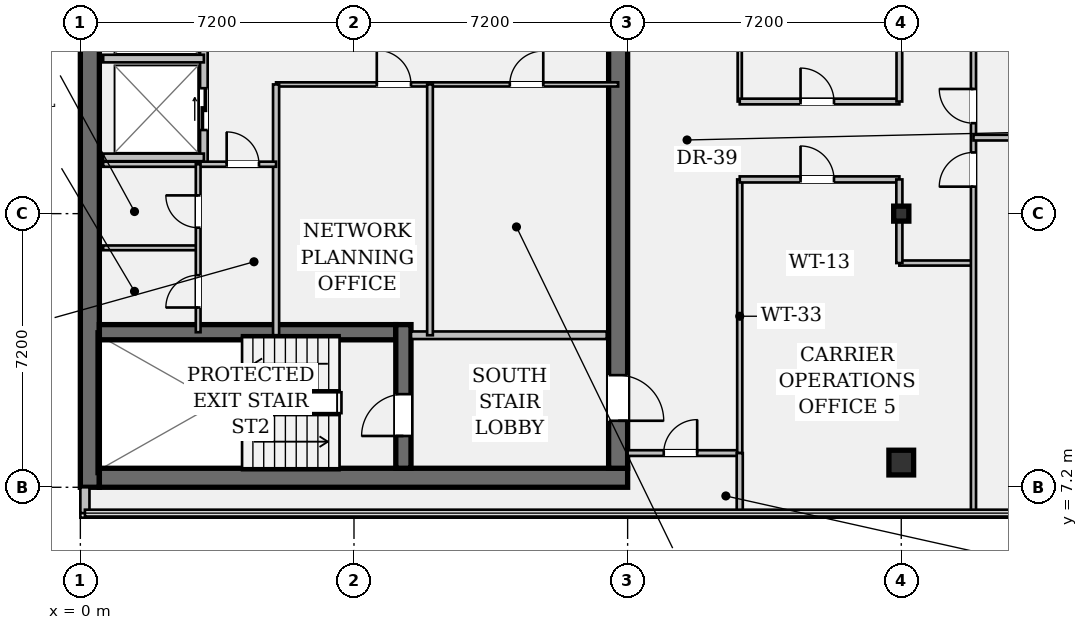
"""IFC4 building model, lengths in metres.
Left out: names, types, materials, properties, quantities, classifications, styles, units other than length and angle.
Written with IfcOpenShell. Run it as: python <this file> out.ifc"""

import sys

from ifc_helpers import new_model, si_unit, direction, frame, frame_2d, origin, origin_2d, place, context, subcontext, project, spatial, rectangle, hollow_rectangle, i_section, extrude, element, fill, save


model = new_model("IFC4")
c1 = context("Model", 3, precision=1e-05, world=origin(), true_north=direction((0.0, 1.0)))
c2 = subcontext(c1, "Body", "Model", "MODEL_VIEW")
j1 = project(units=[si_unit("LENGTHUNIT", "METRE"), si_unit("PLANEANGLEUNIT", "RADIAN")], contexts=[c1])
p1 = place(None, origin())
s1 = spatial("IfcSite", under=j1, at=p1, CompositionType="ELEMENT")
p2 = place(p1, origin())
s2 = spatial("IfcBuilding", under=s1, at=p2, CompositionType="ELEMENT")
p3 = place(p2, frame((0.0, 0.0, 255.15)))
s3 = spatial("IfcBuildingStorey", under=s2, at=p3, CompositionType="ELEMENT", Elevation=255.15)
p4 = place(p3, frame((0.25, 7.2, 0.0), z_axis=(0.0, 0.0, 1.0), x_axis=(0.0, 1.0, 0.0)))
e1 = element("IfcWall", 1, at=p4, inside=s3, PredefinedType="SHEAR", context=c2, shape_type="SweptSolid", body=[
    extrude(rectangle(XDim=28.8, YDim=0.5, at=frame_2d((14.4, 0.0))), origin(), (0.0, 0.0, 1.0), 3.24),
])
p5 = place(p3, frame((0.5, 7.45, 0.0), z_axis=(0.0, 0.0, 1.0), x_axis=(1.0, 0.0, 0.0)))
e2 = element("IfcWall", 2, at=p5, inside=s3, PredefinedType="SHEAR", context=c2, shape_type="SweptSolid", body=[
    extrude(rectangle(XDim=13.9, YDim=0.5, at=frame_2d((6.95, 0.0))), origin(), (0.0, 0.0, 1.0), 3.24),
])
p6 = place(p3, frame((14.15, 35.5, 0.0), z_axis=(0.0, 0.0, 1.0), x_axis=(0.0, -1.0, 0.0)))
e3 = element("IfcWall", 3, at=p6, inside=s3, PredefinedType="SHEAR", context=c2, shape_type="SweptSolid", body=[
    extrude(rectangle(XDim=27.8, YDim=0.5, at=frame_2d((13.9, 0.0))), origin(), (0.0, 0.0, 1.0), 3.24),
])
p7 = place(p6, frame((1.4, 0.0, 0.0)))
e4 = element("IfcOpeningElement", 4, at=p7, cuts=e3, PredefinedType="OPENING", context=c2, shape_type="SweptSolid", body=[
    extrude(rectangle(XDim=1.2, YDim=2.15, at=frame_2d((0.6, 1.075))), frame((0.0, 0.262, 0.0), z_axis=(0.0, -1.0, 0.0), x_axis=(1.0, 0.0, 0.0)), (0.0, 0.0, 1.0), 0.524),
])
p8 = place(p6, frame((25.35, 0.0, 0.0)))
e5 = element("IfcOpeningElement", 5, at=p8, cuts=e3, PredefinedType="OPENING", context=c2, shape_type="SweptSolid", body=[
    extrude(rectangle(XDim=1.2, YDim=2.15, at=frame_2d((0.6, 1.075))), frame((0.0, 0.262, 0.0), z_axis=(0.0, -1.0, 0.0), x_axis=(1.0, 0.0, 0.0)), (0.0, 0.0, 1.0), 0.524),
])
p9 = place(p6, frame((14.7, 0.0, 0.0)))
e6 = element("IfcOpeningElement", 6, at=p9, cuts=e3, PredefinedType="OPENING", context=c2, shape_type="SweptSolid", body=[
    extrude(rectangle(XDim=1.6, YDim=2.2, at=frame_2d((0.8, 1.1))), frame((0.0, 0.262, 0.0), z_axis=(0.0, -1.0, 0.0), x_axis=(1.0, 0.0, 0.0)), (0.0, 0.0, 1.0), 0.524),
])
p10 = place(p3, frame((0.5, 11.28, 0.0), z_axis=(0.0, 0.0, 1.0), x_axis=(1.0, 0.0, 0.0)))
e7 = element("IfcWall", 7, at=p10, inside=s3, PredefinedType="SHEAR", context=c2, shape_type="SweptSolid", body=[
    extrude(rectangle(XDim=7.8, YDim=0.4, at=frame_2d((3.9, 0.0))), origin(), (0.0, 0.0, 1.0), 3.24),
])
p11 = place(p3, frame((8.5, 7.7, 0.0), z_axis=(0.0, 0.0, 1.0), x_axis=(0.0, 1.0, 0.0)))
e8 = element("IfcWall", 8, at=p11, inside=s3, PredefinedType="SHEAR", context=c2, shape_type="SweptSolid", body=[
    extrude(rectangle(XDim=3.78, YDim=0.4, at=frame_2d((1.89, 0.0))), origin(), (0.0, 0.0, 1.0), 3.24),
])
p12 = place(p11, frame((0.85, 0.0, 0.0)))
e9 = element("IfcOpeningElement", 9, at=p12, cuts=e8, PredefinedType="OPENING", context=c2, shape_type="SweptSolid", body=[
    extrude(rectangle(XDim=1.1, YDim=2.15, at=frame_2d((0.55, 1.075))), frame((0.0, 0.212, 0.0), z_axis=(0.0, -1.0, 0.0), x_axis=(1.0, 0.0, 0.0)), (0.0, 0.0, 1.0), 0.424),
])
p13 = place(p3, frame((21.6, 7.85, 0.0), z_axis=(0.0, 0.0, 1.0), x_axis=(1.0, 0.0, 0.0)))
e10 = element("IfcColumn", 10, at=p13, inside=s3, PredefinedType="COLUMN", context=c2, shape_type="SweptSolid", body=[
    extrude(hollow_rectangle(XDim=0.65, YDim=0.65, WallThickness=0.04, at=origin_2d()), origin(), (0.0, 0.0, 1.0), 3.24),
])
p14 = place(p3, frame((21.6, 14.4, 0.0), z_axis=(0.0, 0.0, 1.0), x_axis=(1.0, 0.0, 0.0)))
e11 = element("IfcColumn", 11, at=p14, inside=s3, PredefinedType="COLUMN", context=c2, shape_type="SweptSolid", body=[
    extrude(i_section(OverallWidth=0.399, OverallDepth=0.394, WebThickness=0.023, FlangeThickness=0.037, FilletRadius=0.018, at=origin_2d()), origin(), (0.0, 0.0, 1.0), 3.24),
])
p15 = place(p3, frame((0.12, 6.52, 0.0), z_axis=(0.0, 0.0, 1.0), x_axis=(0.0, 1.0, 0.0)))
e12 = element("IfcWall", 12, at=p15, inside=s3, PredefinedType="STANDARD", context=c2, shape_type="SweptSolid", body=[
    extrude(rectangle(XDim=0.68, YDim=0.24, at=frame_2d((0.34, 0.0))), origin(), (0.0, 0.0, 1.0), 3.24),
])
p16 = place(p3, frame((8.7, 11.2, 0.0), z_axis=(0.0, 0.0, 1.0), x_axis=(1.0, 0.0, 0.0)))
e13 = element("IfcWall", 13, at=p16, inside=s3, PredefinedType="PARTITIONING", context=c2, shape_type="SweptSolid", body=[
    extrude(rectangle(XDim=5.15, YDim=0.2, at=frame_2d((2.575, 0.0))), origin(), (0.0, 0.0, 1.0), 3.24),
])
p17 = place(p3, frame((3.25, 15.7, 0.0), z_axis=(0.0, 0.0, 1.0), x_axis=(0.0, 1.0, 0.0)))
e14 = element("IfcWall", 14, at=p17, inside=s3, PredefinedType="PARTITIONING", context=c2, shape_type="SweptSolid", body=[
    extrude(rectangle(XDim=13.08, YDim=0.2, at=frame_2d((6.54, 0.0))), origin(), (0.0, 0.0, 1.0), 3.24),
])
p18 = place(p17, frame((0.9, 0.0, 0.0)))
e15 = element("IfcOpeningElement", 15, at=p18, cuts=e14, PredefinedType="OPENING", context=c2, shape_type="SweptSolid", body=[
    extrude(rectangle(XDim=1.1, YDim=2.2, at=frame_2d((0.55, 1.1))), frame((0.0, 0.112, 0.0), z_axis=(0.0, -1.0, 0.0), x_axis=(1.0, 0.0, 0.0)), (0.0, 0.0, 1.0), 0.224),
])
p19 = place(p17, frame((3.5, 0.0, 0.0)))
e16 = element("IfcOpeningElement", 16, at=p19, cuts=e14, PredefinedType="OPENING", context=c2, shape_type="SweptSolid", body=[
    extrude(rectangle(XDim=1.1, YDim=2.2, at=frame_2d((0.55, 1.1))), frame((0.0, 0.112, 0.0), z_axis=(0.0, -1.0, 0.0), x_axis=(1.0, 0.0, 0.0)), (0.0, 0.0, 1.0), 0.224),
])
p20 = place(p17, frame((7.2, 0.0, 0.0)))
e17 = element("IfcOpeningElement", 17, at=p20, cuts=e14, PredefinedType="OPENING", context=c2, shape_type="SweptSolid", body=[
    extrude(rectangle(XDim=1.1, YDim=2.2, at=frame_2d((0.55, 1.1))), frame((0.0, 0.112, 0.0), z_axis=(0.0, -1.0, 0.0), x_axis=(1.0, 0.0, 0.0)), (0.0, 0.0, 1.0), 0.224),
])
p21 = place(p17, frame((9.8, 0.0, 0.0)))
e18 = element("IfcOpeningElement", 18, at=p21, cuts=e14, PredefinedType="OPENING", context=c2, shape_type="SweptSolid", body=[
    extrude(rectangle(XDim=1.1, YDim=2.2, at=frame_2d((0.55, 1.1))), frame((0.0, 0.112, 0.0), z_axis=(0.0, -1.0, 0.0), x_axis=(1.0, 0.0, 0.0)), (0.0, 0.0, 1.0), 0.224),
])
for number, where, z_axis, x_axis in (
    (19, (0.6, 15.88, 0.0), (0.0, 0.0, 1.0), (1.0, 0.0, 0.0)),
    (20, (0.6, 18.48, 0.0), (0.0, 0.0, 1.0), (1.0, 0.0, 0.0)),
):
    element("IfcWall", number, at=place(p3, frame(where, z_axis=z_axis, x_axis=x_axis)), inside=s3, PredefinedType="PARTITIONING", context=c2, shape_type="SweptSolid", body=[
        extrude(rectangle(XDim=2.65, YDim=0.2, at=frame_2d((1.325, 0.0))), origin(), (0.0, 0.0, 1.0), 3.24),
    ])
p22 = place(p3, frame((5.15, 17.8, 0.0), z_axis=(0.0, 0.0, 1.0), x_axis=(1.0, 0.0, 0.0)))
e21 = element("IfcWall", 21, at=p22, inside=s3, PredefinedType="PARTITIONING", context=c2, shape_type="SweptSolid", body=[
    extrude(rectangle(XDim=9.0, YDim=0.11, at=frame_2d((4.5, 0.0))), origin(), (0.0, 0.0, 1.0), 3.24),
])
p23 = place(p22, frame((2.65, 0.0, 0.0)))
e22 = element("IfcOpeningElement", 22, at=p23, cuts=e21, PredefinedType="OPENING", context=c2, shape_type="SweptSolid", body=[
    extrude(rectangle(XDim=0.9, YDim=2.15, at=frame_2d((0.45, 1.075))), frame((0.0, 0.067, 0.0), z_axis=(0.0, -1.0, 0.0), x_axis=(1.0, 0.0, 0.0)), (0.0, 0.0, 1.0), 0.134),
])
p24 = place(p22, frame((6.15, 0.0, 0.0)))
e23 = element("IfcOpeningElement", 23, at=p24, cuts=e21, PredefinedType="OPENING", context=c2, shape_type="SweptSolid", body=[
    extrude(rectangle(XDim=0.88, YDim=2.15, at=frame_2d((0.44, 1.075))), frame((0.0, 0.067, 0.0), z_axis=(0.0, -1.0, 0.0), x_axis=(1.0, 0.0, 0.0)), (0.0, 0.0, 1.0), 0.134),
])
p25 = place(p3, frame((5.15, 11.2, 0.0), z_axis=(0.0, 0.0, 1.0), x_axis=(0.0, 1.0, 0.0)))
e24 = element("IfcWall", 24, at=p25, inside=s3, PredefinedType="PARTITIONING", context=c2, shape_type="SweptSolid", body=[
    extrude(rectangle(XDim=6.6, YDim=0.16, at=frame_2d((3.3, 0.0))), origin(), (0.0, 0.0, 1.0), 3.24),
])
p26 = place(p3, frame((9.2, 11.2, 0.0), z_axis=(0.0, 0.0, 1.0), x_axis=(0.0, 1.0, 0.0)))
e25 = element("IfcWall", 25, at=p26, inside=s3, PredefinedType="PARTITIONING", context=c2, shape_type="SweptSolid", body=[
    extrude(rectangle(XDim=6.6, YDim=0.15, at=frame_2d((3.3, 0.0))), origin(), (0.0, 0.0, 1.0), 3.24),
])
p27 = place(p3, frame((0.6, 15.7, 0.0), z_axis=(0.0, 0.0, 1.0), x_axis=(1.0, 0.0, 0.0)))
e26 = element("IfcWall", 26, at=p27, inside=s3, PredefinedType="PARTITIONING", context=c2, shape_type="SweptSolid", body=[
    extrude(rectangle(XDim=4.55, YDim=0.135, at=frame_2d((2.275, 0.0))), origin(), (0.0, 0.0, 1.0), 3.24),
])
p28 = place(p27, frame((3.25, 0.0, 0.0)))
e27 = element("IfcOpeningElement", 27, at=p28, cuts=e26, PredefinedType="OPENING", context=c2, shape_type="SweptSolid", body=[
    extrude(rectangle(XDim=0.85, YDim=2.15, at=frame_2d((0.425, 1.075))), frame((0.0, 0.08, 0.0), z_axis=(0.0, -1.0, 0.0), x_axis=(1.0, 0.0, 0.0)), (0.0, 0.0, 1.0), 0.159),
])
p29 = place(p3, frame((0.6, 13.5, 0.0), z_axis=(0.0, 0.0, 1.0), x_axis=(1.0, 0.0, 0.0)))
e28 = element("IfcWall", 28, at=p29, inside=s3, PredefinedType="PARTITIONING", context=c2, shape_type="SweptSolid", body=[
    extrude(rectangle(XDim=2.5, YDim=0.125, at=frame_2d((1.25, 0.0))), origin(), (0.0, 0.0, 1.0), 3.24),
])
p30 = place(p3, frame((3.1, 11.28, 0.0), z_axis=(0.0, 0.0, 1.0), x_axis=(0.0, 1.0, 0.0)))
e29 = element("IfcWall", 29, at=p30, inside=s3, PredefinedType="PARTITIONING", context=c2, shape_type="SweptSolid", body=[
    extrude(rectangle(XDim=4.42, YDim=0.125, at=frame_2d((2.21, 0.0))), origin(), (0.0, 0.0, 1.0), 3.24),
])
p31 = place(p30, frame((0.65, 0.0, 0.0)))
e30 = element("IfcOpeningElement", 30, at=p31, cuts=e29, PredefinedType="OPENING", context=c2, shape_type="SweptSolid", body=[
    extrude(rectangle(XDim=0.85, YDim=2.15, at=frame_2d((0.425, 1.075))), frame((0.0, 0.074, 0.0), z_axis=(0.0, -1.0, 0.0), x_axis=(1.0, 0.0, 0.0)), (0.0, 0.0, 1.0), 0.149),
])
p32 = place(p30, frame((2.75, 0.0, 0.0)))
e31 = element("IfcOpeningElement", 31, at=p32, cuts=e29, PredefinedType="OPENING", context=c2, shape_type="SweptSolid", body=[
    extrude(rectangle(XDim=0.85, YDim=2.15, at=frame_2d((0.425, 1.075))), frame((0.0, 0.074, 0.0), z_axis=(0.0, -1.0, 0.0), x_axis=(1.0, 0.0, 0.0)), (0.0, 0.0, 1.0), 0.149),
])
p33 = place(p3, frame((14.4, 8.1, 0.0), z_axis=(0.0, 0.0, 1.0), x_axis=(1.0, 0.0, 0.0)))
e32 = element("IfcWall", 32, at=p33, inside=s3, PredefinedType="PARTITIONING", context=c2, shape_type="SweptSolid", body=[
    extrude(rectangle(XDim=2.95, YDim=0.15, at=frame_2d((1.475, 0.0))), origin(), (0.0, 0.0, 1.0), 3.24),
])
p34 = place(p33, frame((0.95, 0.0, 0.0)))
e33 = element("IfcOpeningElement", 33, at=p34, cuts=e32, PredefinedType="OPENING", context=c2, shape_type="SweptSolid", body=[
    extrude(rectangle(XDim=0.88, YDim=2.15, at=frame_2d((0.44, 1.075))), frame((0.0, 0.087, 0.0), z_axis=(0.0, -1.0, 0.0), x_axis=(1.0, 0.0, 0.0)), (0.0, 0.0, 1.0), 0.174),
])
p35 = place(p3, frame((17.35, 8.1, 0.0), z_axis=(0.0, 0.0, 1.0), x_axis=(0.0, 1.0, 0.0)))
e34 = element("IfcWall", 34, at=p35, inside=s3, PredefinedType="PARTITIONING", context=c2, shape_type="SweptSolid", body=[
    extrude(rectangle(XDim=7.2, YDim=0.135, at=frame_2d((3.6, 0.0))), origin(), (0.0, 0.0, 1.0), 2.676),
])
p36 = place(p3, frame((17.35, 17.35, 0.0), z_axis=(0.0, 0.0, 1.0), x_axis=(0.0, 1.0, 0.0)))
e35 = element("IfcWall", 35, at=p36, inside=s3, PredefinedType="PARTITIONING", context=c2, shape_type="SweptSolid", body=[
    extrude(rectangle(XDim=18.55, YDim=0.11, at=frame_2d((9.275, 0.0))), origin(), (0.0, 0.0, 1.0), 2.676),
])
p37 = place(p36, frame((7.85, 0.0, 0.0)))
e36 = element("IfcOpeningElement", 36, at=p37, cuts=e35, PredefinedType="OPENING", context=c2, shape_type="SweptSolid", body=[
    extrude(rectangle(XDim=0.9, YDim=2.15, at=frame_2d((0.45, 1.075))), frame((0.0, 0.067, 0.0), z_axis=(0.0, -1.0, 0.0), x_axis=(1.0, 0.0, 0.0)), (0.0, 0.0, 1.0), 0.134),
])
p38 = place(p36, frame((10.75, 0.0, 0.0)))
e37 = element("IfcOpeningElement", 37, at=p38, cuts=e35, PredefinedType="OPENING", context=c2, shape_type="SweptSolid", body=[
    extrude(rectangle(XDim=0.9, YDim=2.15, at=frame_2d((0.45, 1.075))), frame((0.0, 0.067, 0.0), z_axis=(0.0, -1.0, 0.0), x_axis=(1.0, 0.0, 0.0)), (0.0, 0.0, 1.0), 0.134),
])
p39 = place(p36, frame((13.65, 0.0, 0.0)))
e38 = element("IfcOpeningElement", 38, at=p39, cuts=e35, PredefinedType="OPENING", context=c2, shape_type="SweptSolid", body=[
    extrude(rectangle(XDim=0.9, YDim=2.15, at=frame_2d((0.45, 1.075))), frame((0.0, 0.067, 0.0), z_axis=(0.0, -1.0, 0.0), x_axis=(1.0, 0.0, 0.0)), (0.0, 0.0, 1.0), 0.134),
])
p40 = place(p36, frame((16.55, 0.0, 0.0)))
e39 = element("IfcOpeningElement", 39, at=p40, cuts=e35, PredefinedType="OPENING", context=c2, shape_type="SweptSolid", body=[
    extrude(rectangle(XDim=0.9, YDim=2.15, at=frame_2d((0.45, 1.075))), frame((0.0, 0.067, 0.0), z_axis=(0.0, -1.0, 0.0), x_axis=(1.0, 0.0, 0.0)), (0.0, 0.0, 1.0), 0.134),
])
p41 = place(p3, frame((17.35, 15.3, 0.0), z_axis=(0.0, 0.0, 1.0), x_axis=(1.0, 0.0, 0.0)))
e40 = element("IfcWall", 40, at=p41, inside=s3, PredefinedType="PARTITIONING", context=c2, shape_type="SweptSolid", body=[
    extrude(rectangle(XDim=4.2, YDim=0.16, at=frame_2d((2.1, 0.0))), origin(), (0.0, 0.0, 1.0), 2.808),
])
p42 = place(p41, frame((1.6, 0.0, 0.0)))
e41 = element("IfcOpeningElement", 41, at=p42, cuts=e40, PredefinedType="OPENING", context=c2, shape_type="SweptSolid", body=[
    extrude(rectangle(XDim=0.88, YDim=2.15, at=frame_2d((0.44, 1.075))), frame((0.0, 0.092, 0.0), z_axis=(0.0, -1.0, 0.0), x_axis=(1.0, 0.0, 0.0)), (0.0, 0.0, 1.0), 0.184),
])
p43 = place(p3, frame((17.35, 17.35, 0.0), z_axis=(0.0, 0.0, 1.0), x_axis=(1.0, 0.0, 0.0)))
e42 = element("IfcWall", 42, at=p43, inside=s3, PredefinedType="PARTITIONING", context=c2, shape_type="SweptSolid", body=[
    extrude(rectangle(XDim=4.2, YDim=0.15, at=frame_2d((2.1, 0.0))), origin(), (0.0, 0.0, 1.0), 2.808),
])
p44 = place(p43, frame((1.6, 0.0, 0.0)))
e43 = element("IfcOpeningElement", 43, at=p44, cuts=e42, PredefinedType="OPENING", context=c2, shape_type="SweptSolid", body=[
    extrude(rectangle(XDim=0.88, YDim=2.15, at=frame_2d((0.44, 1.075))), frame((0.0, 0.087, 0.0), z_axis=(0.0, -1.0, 0.0), x_axis=(1.0, 0.0, 0.0)), (0.0, 0.0, 1.0), 0.174),
])
p45 = place(p3, frame((21.55, 13.1, 0.0), z_axis=(0.0, 0.0, 1.0), x_axis=(1.0, 0.0, 0.0)))
e44 = element("IfcWall", 44, at=p45, inside=s3, PredefinedType="PARTITIONING", context=c2, shape_type="SweptSolid", body=[
    extrude(rectangle(XDim=1.95, YDim=0.135, at=frame_2d((0.975, 0.0))), origin(), (0.0, 0.0, 1.0), 2.676),
])
p46 = place(p3, frame((21.55, 13.1, 0.0), z_axis=(0.0, 0.0, 1.0), x_axis=(0.0, 1.0, 0.0)))
e45 = element("IfcWall", 45, at=p46, inside=s3, PredefinedType="PARTITIONING", context=c2, shape_type="SweptSolid", body=[
    extrude(rectangle(XDim=2.2, YDim=0.16, at=frame_2d((1.1, 0.0))), origin(), (0.0, 0.0, 1.0), 2.676),
])
p47 = place(p3, frame((21.55, 17.35, 0.0), z_axis=(0.0, 0.0, 1.0), x_axis=(0.0, 1.0, 0.0)))
e46 = element("IfcWall", 46, at=p47, inside=s3, PredefinedType="PARTITIONING", context=c2, shape_type="SweptSolid", body=[
    extrude(rectangle(XDim=2.2, YDim=0.15, at=frame_2d((1.1, 0.0))), origin(), (0.0, 0.0, 1.0), 2.676),
])
p48 = place(p3, frame((23.5, 6.52, 0.0), z_axis=(0.0, 0.0, 1.0), x_axis=(0.0, 1.0, 0.0)))
e47 = element("IfcWall", 47, at=p48, inside=s3, PredefinedType="PARTITIONING", context=c2, shape_type="SweptSolid", body=[
    extrude(rectangle(XDim=18.56, YDim=0.135, at=frame_2d((9.28, 0.0))), origin(), (0.0, 0.0, 1.0), 2.676),
])
p49 = place(p48, frame((8.59, 0.0, 0.0)))
e48 = element("IfcOpeningElement", 48, at=p49, cuts=e47, PredefinedType="OPENING", context=c2, shape_type="SweptSolid", body=[
    extrude(rectangle(XDim=0.9, YDim=2.15, at=frame_2d((0.45, 1.075))), frame((0.0, 0.08, 0.0), z_axis=(0.0, -1.0, 0.0), x_axis=(1.0, 0.0, 0.0)), (0.0, 0.0, 1.0), 0.159),
])
p50 = place(p48, frame((10.26, 0.0, 0.0)))
e49 = element("IfcOpeningElement", 49, at=p50, cuts=e47, PredefinedType="OPENING", context=c2, shape_type="SweptSolid", body=[
    extrude(rectangle(XDim=0.9, YDim=2.15, at=frame_2d((0.45, 1.075))), frame((0.0, 0.08, 0.0), z_axis=(0.0, -1.0, 0.0), x_axis=(1.0, 0.0, 0.0)), (0.0, 0.0, 1.0), 0.159),
])
p51 = place(p3, frame((17.35, 6.52, 0.0), z_axis=(0.0, 0.0, 1.0), x_axis=(0.0, 1.0, 0.0)))
e50 = element("IfcWall", 50, at=p51, inside=s3, PredefinedType="PARTITIONING", context=c2, shape_type="SweptSolid", body=[
    extrude(rectangle(XDim=1.58, YDim=0.16, at=frame_2d((0.79, 0.0))), origin(), (0.0, 0.0, 1.0), 3.24),
])
p52 = place(p3, frame((23.5, 16.4, 0.0), z_axis=(0.0, 0.0, 1.0), x_axis=(1.0, 0.0, 0.0)))
e51 = element("IfcWall", 51, at=p52, inside=s3, PredefinedType="PARTITIONING", context=c2, shape_type="SweptSolid", body=[
    extrude(rectangle(XDim=21.98, YDim=0.15, at=frame_2d((10.99, 0.0))), origin(), (0.0, 0.0, 1.0), 2.676),
])
p53 = place(p12, origin())
e52 = element("IfcDoor", 52, at=p53, inside=s3, OperationType="SINGLE_SWING_LEFT", PredefinedType="DOOR", context=c2, shape_type="SweptSolid", body=[
    extrude(rectangle(XDim=1.1, YDim=2.15, at=frame_2d((0.55, 1.075))), frame((0.0, 0.025, 0.0), z_axis=(0.0, -1.0, 0.0), x_axis=(1.0, 0.0, 0.0)), (0.0, 0.0, 1.0), 0.05),
])
fill(e9, e52)
p54 = place(p8, origin())
e53 = element("IfcDoor", 53, at=p54, inside=s3, OperationType="SINGLE_SWING_RIGHT", PredefinedType="DOOR", context=c2, shape_type="SweptSolid", body=[
    extrude(rectangle(XDim=1.2, YDim=2.15, at=frame_2d((0.6, 1.075))), frame((0.0, 0.025, 0.0), z_axis=(0.0, -1.0, 0.0), x_axis=(1.0, 0.0, 0.0)), (0.0, 0.0, 1.0), 0.05),
])
fill(e5, e53)
p55 = place(p18, origin())
e54 = element("IfcDoor", 54, at=p55, inside=s3, OperationType="DOUBLE_DOOR_SLIDING", PredefinedType="DOOR", context=c2, shape_type="SweptSolid", body=[
    extrude(rectangle(XDim=1.1, YDim=2.2, at=frame_2d((0.55, 1.1))), frame((0.0, 0.025, 0.0), z_axis=(0.0, -1.0, 0.0), x_axis=(1.0, 0.0, 0.0)), (0.0, 0.0, 1.0), 0.05),
])
fill(e15, e54)
p56 = place(p23, origin())
e55 = element("IfcDoor", 55, at=p56, inside=s3, OperationType="SINGLE_SWING_LEFT", PredefinedType="DOOR", context=c2, shape_type="SweptSolid", body=[
    extrude(rectangle(XDim=0.9, YDim=2.15, at=frame_2d((0.45, 1.075))), frame((0.0, 0.025, 0.0), z_axis=(0.0, -1.0, 0.0), x_axis=(1.0, 0.0, 0.0)), (0.0, 0.0, 1.0), 0.05),
])
fill(e22, e55)
p57 = place(p24, origin())
e56 = element("IfcDoor", 56, at=p57, inside=s3, OperationType="SINGLE_SWING_RIGHT", PredefinedType="DOOR", context=c2, shape_type="SweptSolid", body=[
    extrude(rectangle(XDim=0.88, YDim=2.15, at=frame_2d((0.44, 1.075))), frame((0.0, 0.025, 0.0), z_axis=(0.0, -1.0, 0.0), x_axis=(1.0, 0.0, 0.0)), (0.0, 0.0, 1.0), 0.05),
])
fill(e23, e56)
p58 = place(p28, origin())
e57 = element("IfcDoor", 57, at=p58, inside=s3, OperationType="SINGLE_SWING_LEFT", PredefinedType="DOOR", context=c2, shape_type="SweptSolid", body=[
    extrude(rectangle(XDim=0.85, YDim=2.15, at=frame_2d((0.425, 1.075))), frame((0.0, 0.025, 0.0), z_axis=(0.0, -1.0, 0.0), x_axis=(1.0, 0.0, 0.0)), (0.0, 0.0, 1.0), 0.05),
])
fill(e27, e57)
p59 = place(p31, origin())
e58 = element("IfcDoor", 58, at=p59, inside=s3, OperationType="SINGLE_SWING_LEFT", PredefinedType="DOOR", context=c2, shape_type="SweptSolid", body=[
    extrude(rectangle(XDim=0.85, YDim=2.15, at=frame_2d((0.425, 1.075))), frame((0.0, 0.025, 0.0), z_axis=(0.0, -1.0, 0.0), x_axis=(1.0, 0.0, 0.0)), (0.0, 0.0, 1.0), 0.05),
])
fill(e30, e58)
p60 = place(p32, origin())
e59 = element("IfcDoor", 59, at=p60, inside=s3, OperationType="SINGLE_SWING_RIGHT", PredefinedType="DOOR", context=c2, shape_type="SweptSolid", body=[
    extrude(rectangle(XDim=0.85, YDim=2.15, at=frame_2d((0.425, 1.075))), frame((0.0, 0.025, 0.0), z_axis=(0.0, -1.0, 0.0), x_axis=(1.0, 0.0, 0.0)), (0.0, 0.0, 1.0), 0.05),
])
fill(e31, e59)
p61 = place(p44, origin())
e60 = element("IfcDoor", 60, at=p61, inside=s3, OperationType="SINGLE_SWING_LEFT", PredefinedType="DOOR", context=c2, shape_type="SweptSolid", body=[
    extrude(rectangle(XDim=0.88, YDim=2.15, at=frame_2d((0.44, 1.075))), frame((0.0, 0.025, 0.0), z_axis=(0.0, -1.0, 0.0), x_axis=(1.0, 0.0, 0.0)), (0.0, 0.0, 1.0), 0.05),
])
fill(e43, e60)
p62 = place(p34, origin())
e61 = element("IfcDoor", 61, at=p62, inside=s3, OperationType="SINGLE_SWING_RIGHT", PredefinedType="DOOR", context=c2, shape_type="SweptSolid", body=[
    extrude(rectangle(XDim=0.88, YDim=2.15, at=frame_2d((0.44, 1.075))), frame((0.0, 0.025, 0.0), z_axis=(0.0, -1.0, 0.0), x_axis=(1.0, 0.0, 0.0)), (0.0, 0.0, 1.0), 0.05),
])
fill(e33, e61)
p63 = place(p42, origin())
e62 = element("IfcDoor", 62, at=p63, inside=s3, OperationType="SINGLE_SWING_LEFT", PredefinedType="DOOR", context=c2, shape_type="SweptSolid", body=[
    extrude(rectangle(XDim=0.88, YDim=2.15, at=frame_2d((0.44, 1.075))), frame((0.0, 0.025, 0.0), z_axis=(0.0, -1.0, 0.0), x_axis=(1.0, 0.0, 0.0)), (0.0, 0.0, 1.0), 0.05),
])
fill(e41, e62)
p64 = place(p49, origin())
e63 = element("IfcDoor", 63, at=p64, inside=s3, OperationType="SINGLE_SWING_LEFT", PredefinedType="DOOR", context=c2, shape_type="SweptSolid", body=[
    extrude(rectangle(XDim=0.9, YDim=2.15, at=frame_2d((0.45, 1.075))), frame((0.0, 0.025, 0.0), z_axis=(0.0, -1.0, 0.0), x_axis=(1.0, 0.0, 0.0)), (0.0, 0.0, 1.0), 0.05),
])
fill(e48, e63)
p65 = place(p50, origin())
e64 = element("IfcDoor", 64, at=p65, inside=s3, OperationType="SINGLE_SWING_RIGHT", PredefinedType="DOOR", context=c2, shape_type="SweptSolid", body=[
    extrude(rectangle(XDim=0.9, YDim=2.15, at=frame_2d((0.45, 1.075))), frame((0.0, 0.025, 0.0), z_axis=(0.0, -1.0, 0.0), x_axis=(1.0, 0.0, 0.0)), (0.0, 0.0, 1.0), 0.05),
])
fill(e49, e64)
save(model, sys.argv[1])
